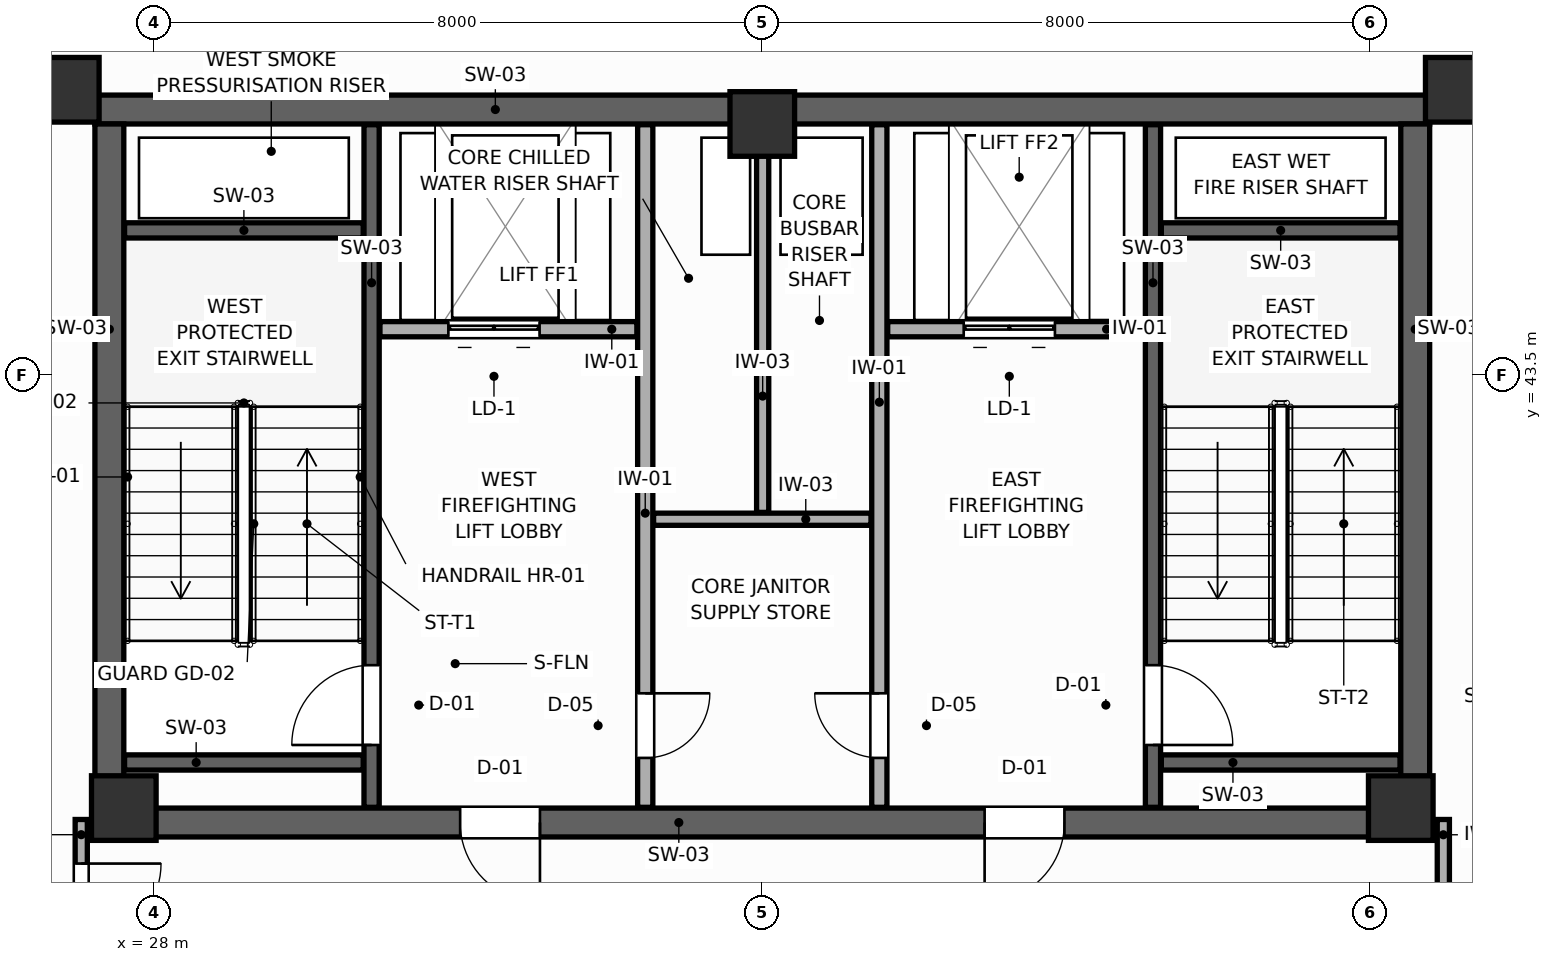
"""IFC4 building model, lengths in metres.
Left out: names, types, materials, properties, quantities, classifications, styles, units other than length and angle.
Written with IfcOpenShell. Run it as: python <this file> out.ifc"""

import sys

from ifc_helpers import new_model, si_unit, direction, frame, frame_2d, origin, origin_2d, place, context, subcontext, project, spatial, rectangle, extrude, source, transform, mapped, element, fill, save


model = new_model("IFC4")
c1 = context("Model", 3, precision=1e-05, world=origin(), true_north=direction((0.0, 1.0)))
c2 = subcontext(c1, "Body", "Model", "MODEL_VIEW")
j1 = project(units=[si_unit("LENGTHUNIT", "METRE"), si_unit("PLANEANGLEUNIT", "RADIAN")], contexts=[c1])
p1 = place(None, origin())
s1 = spatial("IfcSite", under=j1, at=p1, CompositionType="ELEMENT")
p2 = place(p1, origin())
s2 = spatial("IfcBuilding", under=s1, at=p2, CompositionType="ELEMENT")
p3 = place(p2, frame((0.0, 0.0, 283.8)))
s3 = spatial("IfcBuildingStorey", under=s2, at=p3, CompositionType="ELEMENT", Elevation=283.8)
p4 = place(p3, frame((27.22, 46.99, 0.0), z_axis=(0.0, 0.0, 1.0), x_axis=(1.0, 0.0, 0.0)))
e1 = element("IfcWall", 1, at=p4, inside=s3, PredefinedType="SHEAR", context=c2, shape_type="SweptSolid", body=[
    extrude(rectangle(XDim=17.56, YDim=0.38, at=frame_2d((8.78, 0.0))), origin(), (0.0, 0.0, 1.0), 4.2),
])
p5 = place(p3, frame((27.22, 37.61, 0.0), z_axis=(0.0, 0.0, 1.0), x_axis=(1.0, 0.0, 0.0)))
e2 = element("IfcWall", 2, at=p5, inside=s3, PredefinedType="SHEAR", context=c2, shape_type="SweptSolid", body=[
    extrude(rectangle(XDim=17.56, YDim=0.38, at=frame_2d((8.78, 0.0))), origin(), (0.0, 0.0, 1.0), 4.2),
])
p6 = place(p5, frame((4.805, 0.0, 0.0)))
e3 = element("IfcOpeningElement", 3, at=p6, cuts=e2, PredefinedType="OPENING", context=c2, shape_type="SweptSolid", body=[
    extrude(rectangle(XDim=1.05, YDim=2.1, at=frame_2d((0.525, 1.05))), frame((0.0, 0.2, 0.0), z_axis=(0.0, -1.0, 0.0), x_axis=(1.0, 0.0, 0.0)), (0.0, 0.0, 1.0), 0.4),
])
p7 = place(p5, frame((11.705, 0.0, 0.0)))
e4 = element("IfcOpeningElement", 4, at=p7, cuts=e2, PredefinedType="OPENING", context=c2, shape_type="SweptSolid", body=[
    extrude(rectangle(XDim=1.05, YDim=2.1, at=frame_2d((0.525, 1.05))), frame((0.0, 0.2, 0.0), z_axis=(0.0, -1.0, 0.0), x_axis=(1.0, 0.0, 0.0)), (0.0, 0.0, 1.0), 0.4),
])
for number, where, z_axis, x_axis in (
    (5, (27.41, 37.8, 0.0), (0.0, 0.0, 1.0), (0.0, 1.0, 0.0)),
    (6, (44.59, 37.8, 0.0), (0.0, 0.0, 1.0), (0.0, 1.0, 0.0)),
):
    element("IfcWall", number, at=place(p3, frame(where, z_axis=z_axis, x_axis=x_axis)), inside=s3, PredefinedType="SHEAR", context=c2, shape_type="SweptSolid", body=[
        extrude(rectangle(XDim=9.0, YDim=0.38, at=frame_2d((4.5, 0.0))), origin(), (0.0, 0.0, 1.0), 4.2),
    ])
m1 = source(origin(), c2, "Body", "SweptSolid", [
    extrude(rectangle(XDim=0.85, YDim=0.85, at=origin_2d()), origin(), (0.0, 0.0, 1.0), 4.2),
])
for number, where, z_axis, x_axis in (
    (7, (26.85, 47.25, 0.0), (0.0, 0.0, 1.0), (1.0, 0.0, 0.0)),
    (8, (45.15, 47.25, 0.0), (0.0, 0.0, 1.0), (1.0, 0.0, 0.0)),
    (9, (27.6, 37.8, 0.0), (0.0, 0.0, 1.0), (1.0, 0.0, 0.0)),
    (10, (44.4, 37.8, 0.0), (0.0, 0.0, 1.0), (1.0, 0.0, 0.0)),
    (11, (36.0, 46.8, 0.0), (0.0, 0.0, 1.0), (1.0, 0.0, 0.0)),
):
    element("IfcColumn", number, at=place(p3, frame(where, z_axis=z_axis, x_axis=x_axis)), inside=s3, PredefinedType="COLUMN", context=c2, shape_type="MappedRepresentation", body=[
        mapped(m1, transform((0.0, 0.0, 0.0), scale=1.0)),
    ])
p8 = place(p3, frame((30.354, 49.504, 0.0), z_axis=(0.0, 0.0, 1.0), x_axis=(-0.988436984166, -0.151632214035, 0.0)))
e12 = element("IfcWall", 12, at=p8, inside=s3, PredefinedType="SOLIDWALL", context=c2, shape_type="SweptSolid", body=[
    extrude(rectangle(XDim=12.001, YDim=0.28, at=frame_2d((6.001, 0.0))), origin(), (0.0, 0.0, 1.0), 2.52),
])
p9 = place(p3, frame((30.86, 37.81, 0.0), z_axis=(0.0, 0.0, 1.0), x_axis=(0.0, 1.0, 0.0)))
e13 = element("IfcWall", 13, at=p9, inside=s3, PredefinedType="SHEAR", context=c2, shape_type="SweptSolid", body=[
    extrude(rectangle(XDim=8.98, YDim=0.2, at=frame_2d((4.49, 0.0))), origin(), (0.0, 0.0, 1.0), 4.2),
])
p10 = place(p9, frame((0.82, 0.0, 0.0)))
e14 = element("IfcOpeningElement", 14, at=p10, cuts=e13, PredefinedType="OPENING", context=c2, shape_type="SweptSolid", body=[
    extrude(rectangle(XDim=1.05, YDim=2.1, at=frame_2d((0.525, 1.05))), frame((0.0, 0.11, 0.0), z_axis=(0.0, -1.0, 0.0), x_axis=(1.0, 0.0, 0.0)), (0.0, 0.0, 1.0), 0.22),
])
for number, where, z_axis, x_axis in (
    (15, (27.61, 45.4, 0.0), (0.0, 0.0, 1.0), (1.0, 0.0, 0.0)),
    (16, (27.61, 38.4, 0.0), (0.0, 0.0, 1.0), (1.0, 0.0, 0.0)),
):
    element("IfcWall", number, at=place(p3, frame(where, z_axis=z_axis, x_axis=x_axis)), inside=s3, PredefinedType="SHEAR", context=c2, shape_type="SweptSolid", body=[
        extrude(rectangle(XDim=3.14, YDim=0.2, at=frame_2d((1.57, 0.0))), origin(), (0.0, 0.0, 1.0), 4.2),
    ])
p11 = place(p3, frame((41.14, 37.81, 0.0), z_axis=(0.0, 0.0, 1.0), x_axis=(0.0, 1.0, 0.0)))
e17 = element("IfcWall", 17, at=p11, inside=s3, PredefinedType="SHEAR", context=c2, shape_type="SweptSolid", body=[
    extrude(rectangle(XDim=8.98, YDim=0.2, at=frame_2d((4.49, 0.0))), origin(), (0.0, 0.0, 1.0), 4.2),
])
p12 = place(p11, frame((0.82, 0.0, 0.0)))
e18 = element("IfcOpeningElement", 18, at=p12, cuts=e17, PredefinedType="OPENING", context=c2, shape_type="SweptSolid", body=[
    extrude(rectangle(XDim=1.05, YDim=2.1, at=frame_2d((0.525, 1.05))), frame((0.0, 0.11, 0.0), z_axis=(0.0, -1.0, 0.0), x_axis=(1.0, 0.0, 0.0)), (0.0, 0.0, 1.0), 0.22),
])
for number, where, z_axis, x_axis in (
    (19, (41.25, 45.4, 0.0), (0.0, 0.0, 1.0), (1.0, 0.0, 0.0)),
    (20, (41.25, 38.4, 0.0), (0.0, 0.0, 1.0), (1.0, 0.0, 0.0)),
):
    element("IfcWall", number, at=place(p3, frame(where, z_axis=z_axis, x_axis=x_axis)), inside=s3, PredefinedType="SHEAR", context=c2, shape_type="SweptSolid", body=[
        extrude(rectangle(XDim=3.14, YDim=0.2, at=frame_2d((1.57, 0.0))), origin(), (0.0, 0.0, 1.0), 4.2),
    ])
p13 = place(p3, frame((30.97, 44.1, 0.0), z_axis=(0.0, 0.0, 1.0), x_axis=(1.0, 0.0, 0.0)))
e21 = element("IfcWall", 21, at=p13, inside=s3, PredefinedType="PARTITIONING", context=c2, shape_type="SweptSolid", body=[
    extrude(rectangle(XDim=3.38, YDim=0.2, at=frame_2d((1.69, 0.0))), origin(), (0.0, 0.0, 1.0), 3.96),
])
p14 = place(p13, frame((0.9, 0.0, 0.0)))
e22 = element("IfcOpeningElement", 22, at=p14, cuts=e21, PredefinedType="OPENING", context=c2, shape_type="SweptSolid", body=[
    extrude(rectangle(XDim=1.2, YDim=2.1, at=frame_2d((0.6, 1.05))), frame((0.0, 0.11, 0.0), z_axis=(0.0, -1.0, 0.0), x_axis=(1.0, 0.0, 0.0)), (0.0, 0.0, 1.0), 0.22),
])
p15 = place(p3, frame((37.65, 44.1, 0.0), z_axis=(0.0, 0.0, 1.0), x_axis=(1.0, 0.0, 0.0)))
e23 = element("IfcWall", 23, at=p15, inside=s3, PredefinedType="PARTITIONING", context=c2, shape_type="SweptSolid", body=[
    extrude(rectangle(XDim=3.38, YDim=0.2, at=frame_2d((1.69, 0.0))), origin(), (0.0, 0.0, 1.0), 3.96),
])
p16 = place(p15, frame((1.0, 0.0, 0.0)))
e24 = element("IfcOpeningElement", 24, at=p16, cuts=e23, PredefinedType="OPENING", context=c2, shape_type="SweptSolid", body=[
    extrude(rectangle(XDim=1.2, YDim=2.1, at=frame_2d((0.6, 1.05))), frame((0.0, 0.11, 0.0), z_axis=(0.0, -1.0, 0.0), x_axis=(1.0, 0.0, 0.0)), (0.0, 0.0, 1.0), 0.22),
])
p17 = place(p3, frame((34.46, 37.81, 0.0), z_axis=(0.0, 0.0, 1.0), x_axis=(0.0, 1.0, 0.0)))
e25 = element("IfcWall", 25, at=p17, inside=s3, PredefinedType="PARTITIONING", context=c2, shape_type="SweptSolid", body=[
    extrude(rectangle(XDim=8.98, YDim=0.2, at=frame_2d((4.49, 0.0))), origin(), (0.0, 0.0, 1.0), 3.96),
])
p18 = place(p17, frame((0.65, 0.0, 0.0)))
e26 = element("IfcOpeningElement", 26, at=p18, cuts=e25, PredefinedType="OPENING", context=c2, shape_type="SweptSolid", body=[
    extrude(rectangle(XDim=0.85, YDim=2.05, at=frame_2d((0.425, 1.025))), frame((0.0, 0.11, 0.0), z_axis=(0.0, -1.0, 0.0), x_axis=(1.0, 0.0, 0.0)), (0.0, 0.0, 1.0), 0.22),
])
p19 = place(p3, frame((37.54, 37.81, 0.0), z_axis=(0.0, 0.0, 1.0), x_axis=(0.0, 1.0, 0.0)))
e27 = element("IfcWall", 27, at=p19, inside=s3, PredefinedType="PARTITIONING", context=c2, shape_type="SweptSolid", body=[
    extrude(rectangle(XDim=8.98, YDim=0.2, at=frame_2d((4.49, 0.0))), origin(), (0.0, 0.0, 1.0), 3.96),
])
p20 = place(p19, frame((0.65, 0.0, 0.0)))
e28 = element("IfcOpeningElement", 28, at=p20, cuts=e27, PredefinedType="OPENING", context=c2, shape_type="SweptSolid", body=[
    extrude(rectangle(XDim=0.85, YDim=2.05, at=frame_2d((0.425, 1.025))), frame((0.0, 0.11, 0.0), z_axis=(0.0, -1.0, 0.0), x_axis=(1.0, 0.0, 0.0)), (0.0, 0.0, 1.0), 0.22),
])
p21 = place(p3, frame((34.57, 41.6, 0.0), z_axis=(0.0, 0.0, 1.0), x_axis=(1.0, 0.0, 0.0)))
e29 = element("IfcWall", 29, at=p21, inside=s3, PredefinedType="PARTITIONING", context=c2, shape_type="SweptSolid", body=[
    extrude(rectangle(XDim=2.86, YDim=0.16, at=frame_2d((1.43, 0.0))), origin(), (0.0, 0.0, 1.0), 3.96),
])
p22 = place(p3, frame((36.005, 41.69, 0.0), z_axis=(0.0, 0.0, 1.0), x_axis=(0.0, 1.0, 0.0)))
e30 = element("IfcWall", 30, at=p22, inside=s3, PredefinedType="PARTITIONING", context=c2, shape_type="SweptSolid", body=[
    extrude(rectangle(XDim=5.1, YDim=0.16, at=frame_2d((2.55, 0.0))), origin(), (0.0, 0.0, 1.0), 3.96),
])
p23 = place(p3, frame((27.04, 35.54, 0.0), z_axis=(0.0, 0.0, 1.0), x_axis=(0.0, 1.0, 0.0)))
e31 = element("IfcWall", 31, at=p23, inside=s3, PredefinedType="PARTITIONING", context=c2, shape_type="SweptSolid", body=[
    extrude(rectangle(XDim=2.11, YDim=0.16, at=frame_2d((1.055, 0.0))), origin(), (0.0, 0.0, 1.0), 3.96),
])
p24 = place(p23, frame((0.48, 0.0, 0.0)))
e32 = element("IfcOpeningElement", 32, at=p24, cuts=e31, PredefinedType="OPENING", context=c2, shape_type="SweptSolid", body=[
    extrude(rectangle(XDim=1.05, YDim=2.1, at=frame_2d((0.525, 1.05))), frame((0.0, 0.09, 0.0), z_axis=(0.0, -1.0, 0.0), x_axis=(1.0, 0.0, 0.0)), (0.0, 0.0, 1.0), 0.18),
])
p25 = place(p3, frame((44.96, 35.0, 0.0), z_axis=(0.0, 0.0, 1.0), x_axis=(0.0, 1.0, 0.0)))
e33 = element("IfcWall", 33, at=p25, inside=s3, PredefinedType="PARTITIONING", context=c2, shape_type="SweptSolid", body=[
    extrude(rectangle(XDim=2.65, YDim=0.16, at=frame_2d((1.325, 0.0))), origin(), (0.0, 0.0, 1.0), 3.96),
])
p26 = place(p25, frame((0.75, 0.0, 0.0)))
e34 = element("IfcOpeningElement", 34, at=p26, cuts=e33, PredefinedType="OPENING", context=c2, shape_type="SweptSolid", body=[
    extrude(rectangle(XDim=1.05, YDim=2.1, at=frame_2d((0.525, 1.05))), frame((0.0, 0.09, 0.0), z_axis=(0.0, -1.0, 0.0), x_axis=(1.0, 0.0, 0.0)), (0.0, 0.0, 1.0), 0.18),
])
p27 = place(p10, origin())
e35 = element("IfcDoor", 35, at=p27, inside=s3, OperationType="SINGLE_SWING_LEFT", PredefinedType="DOOR", context=c2, shape_type="SweptSolid", body=[
    extrude(rectangle(XDim=1.05, YDim=2.1, at=frame_2d((0.525, 1.05))), frame((0.0, 0.025, 0.0), z_axis=(0.0, -1.0, 0.0), x_axis=(1.0, 0.0, 0.0)), (0.0, 0.0, 1.0), 0.05),
])
fill(e14, e35)
p28 = place(p12, frame((1.05, 0.0, 0.0), z_axis=(0.0, 0.0, 1.0), x_axis=(-1.0, 0.0, 0.0)))
e36 = element("IfcDoor", 36, at=p28, inside=s3, OperationType="SINGLE_SWING_RIGHT", PredefinedType="DOOR", context=c2, shape_type="SweptSolid", body=[
    extrude(rectangle(XDim=1.05, YDim=2.1, at=frame_2d((0.525, 1.05))), frame((0.0, 0.025, 0.0), z_axis=(0.0, -1.0, 0.0), x_axis=(1.0, 0.0, 0.0)), (0.0, 0.0, 1.0), 0.05),
])
fill(e18, e36)
p29 = place(p14, origin())
e37 = element("IfcDoor", 37, at=p29, inside=s3, OperationType="DOUBLE_DOOR_SLIDING", PredefinedType="DOOR", context=c2, shape_type="SweptSolid", body=[
    extrude(rectangle(XDim=1.2, YDim=2.1, at=frame_2d((0.6, 1.05))), frame((0.0, 0.025, 0.0), z_axis=(0.0, -1.0, 0.0), x_axis=(1.0, 0.0, 0.0)), (0.0, 0.0, 1.0), 0.05),
])
fill(e22, e37)
p30 = place(p16, origin())
e38 = element("IfcDoor", 38, at=p30, inside=s3, OperationType="DOUBLE_DOOR_SLIDING", PredefinedType="DOOR", context=c2, shape_type="SweptSolid", body=[
    extrude(rectangle(XDim=1.2, YDim=2.1, at=frame_2d((0.6, 1.05))), frame((0.0, 0.025, 0.0), z_axis=(0.0, -1.0, 0.0), x_axis=(1.0, 0.0, 0.0)), (0.0, 0.0, 1.0), 0.05),
])
fill(e24, e38)
p31 = place(p18, frame((0.85, 0.0, 0.0), z_axis=(0.0, 0.0, 1.0), x_axis=(-1.0, 0.0, 0.0)))
e39 = element("IfcDoor", 39, at=p31, inside=s3, OperationType="SINGLE_SWING_LEFT", PredefinedType="DOOR", context=c2, shape_type="SweptSolid", body=[
    extrude(rectangle(XDim=0.85, YDim=2.05, at=frame_2d((0.425, 1.025))), frame((0.0, 0.025, 0.0), z_axis=(0.0, -1.0, 0.0), x_axis=(1.0, 0.0, 0.0)), (0.0, 0.0, 1.0), 0.05),
])
fill(e26, e39)
p32 = place(p20, origin())
e40 = element("IfcDoor", 40, at=p32, inside=s3, OperationType="SINGLE_SWING_RIGHT", PredefinedType="DOOR", context=c2, shape_type="SweptSolid", body=[
    extrude(rectangle(XDim=0.85, YDim=2.05, at=frame_2d((0.425, 1.025))), frame((0.0, 0.025, 0.0), z_axis=(0.0, -1.0, 0.0), x_axis=(1.0, 0.0, 0.0)), (0.0, 0.0, 1.0), 0.05),
])
fill(e28, e40)
p33 = place(p24, frame((1.05, 0.0, 0.0), z_axis=(0.0, 0.0, 1.0), x_axis=(-1.0, 0.0, 0.0)))
e41 = element("IfcDoor", 41, at=p33, inside=s3, OperationType="SINGLE_SWING_LEFT", PredefinedType="DOOR", context=c2, shape_type="SweptSolid", body=[
    extrude(rectangle(XDim=1.05, YDim=2.1, at=frame_2d((0.525, 1.05))), frame((0.0, 0.025, 0.0), z_axis=(0.0, -1.0, 0.0), x_axis=(1.0, 0.0, 0.0)), (0.0, 0.0, 1.0), 0.05),
])
fill(e32, e41)
p34 = place(p6, frame((1.05, 0.0, 0.0), z_axis=(0.0, 0.0, 1.0), x_axis=(-1.0, 0.0, 0.0)))
e42 = element("IfcDoor", 42, at=p34, inside=s3, OperationType="SINGLE_SWING_LEFT", PredefinedType="DOOR", context=c2, shape_type="SweptSolid", body=[
    extrude(rectangle(XDim=1.05, YDim=2.1, at=frame_2d((0.525, 1.05))), frame((0.0, 0.025, 0.0), z_axis=(0.0, -1.0, 0.0), x_axis=(1.0, 0.0, 0.0)), (0.0, 0.0, 1.0), 0.05),
])
fill(e3, e42)
p35 = place(p7, frame((1.05, 0.0, 0.0), z_axis=(0.0, 0.0, 1.0), x_axis=(-1.0, 0.0, 0.0)))
e43 = element("IfcDoor", 43, at=p35, inside=s3, OperationType="SINGLE_SWING_RIGHT", PredefinedType="DOOR", context=c2, shape_type="SweptSolid", body=[
    extrude(rectangle(XDim=1.05, YDim=2.1, at=frame_2d((0.525, 1.05))), frame((0.0, 0.025, 0.0), z_axis=(0.0, -1.0, 0.0), x_axis=(1.0, 0.0, 0.0)), (0.0, 0.0, 1.0), 0.05),
])
fill(e4, e43)
save(model, sys.argv[1])
